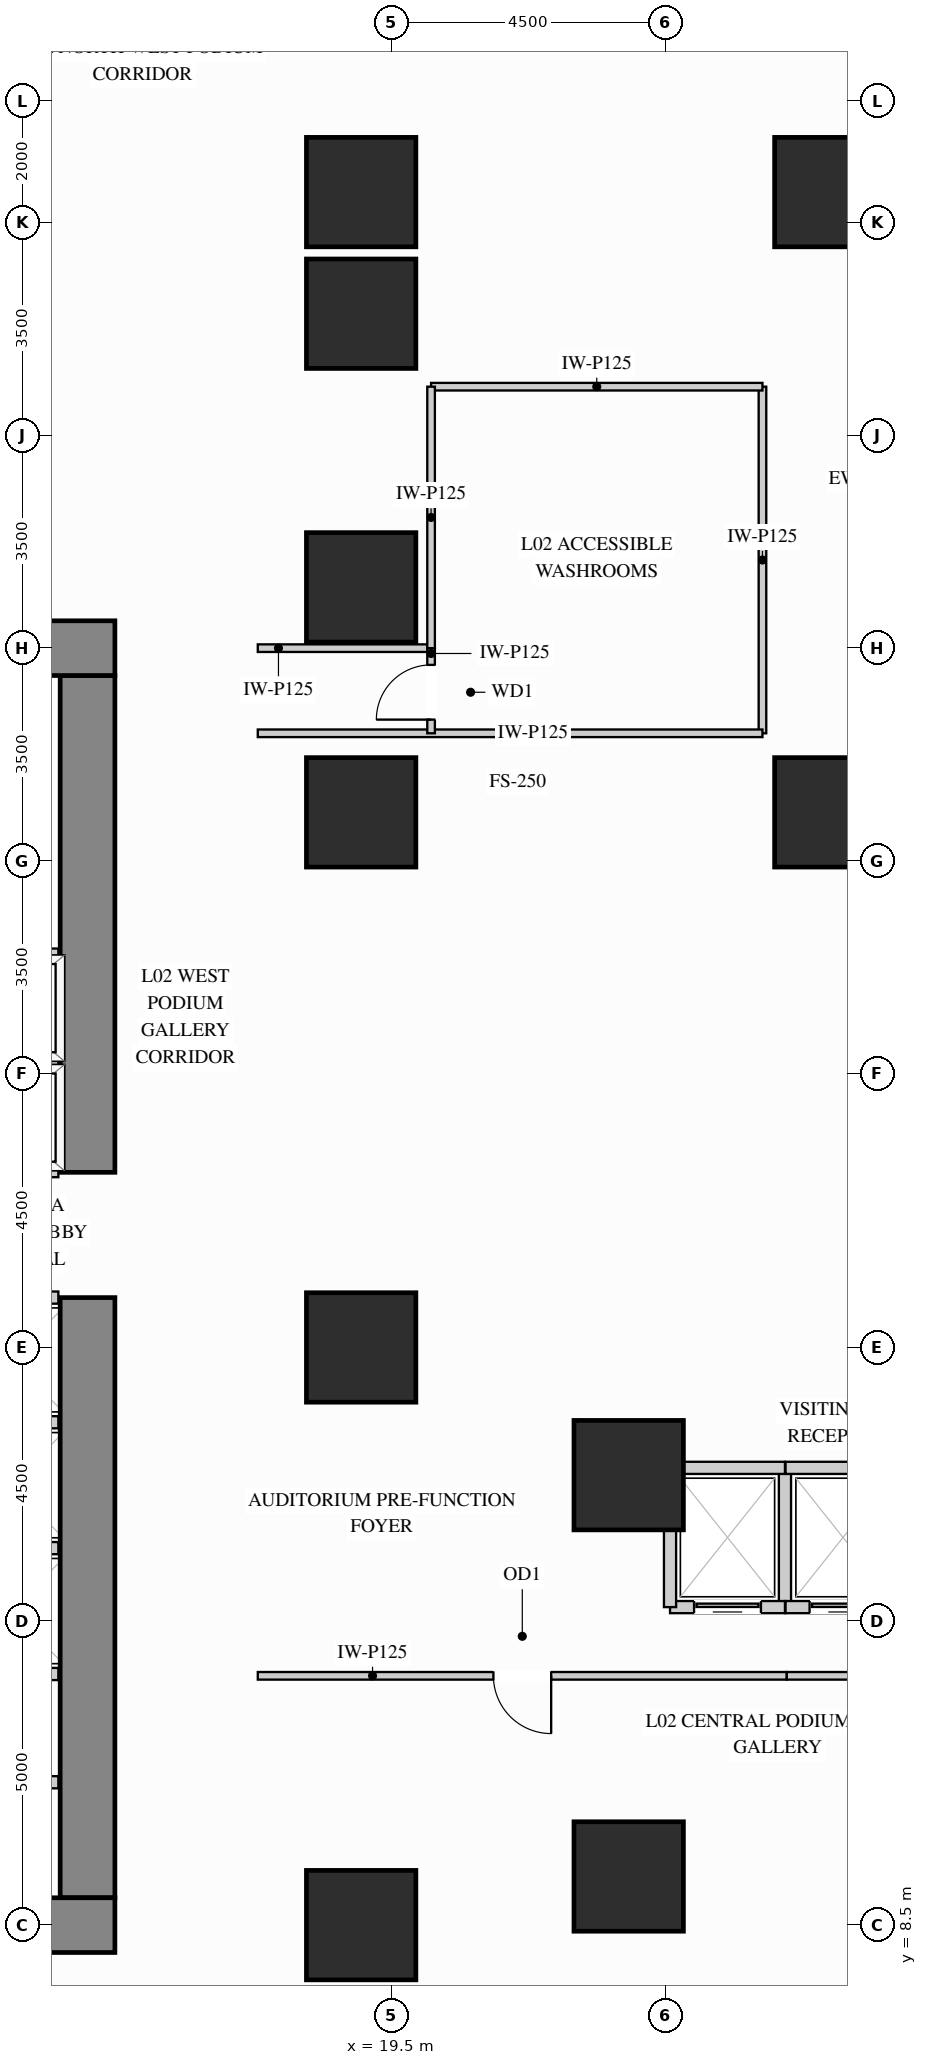
"""IFC4 building model, lengths in metres.
Left out: names, types, materials, properties, quantities, classifications, styles, units other than length and angle.
Written with IfcOpenShell. Run it as: python <this file> out.ifc"""

import sys

from ifc_helpers import new_model, si_unit, direction, frame, frame_2d, origin, origin_2d, place, context, subcontext, project, spatial, rectangle, extrude, source, transform, mapped, element, fill, save


model = new_model("IFC4")
c1 = context("Model", 3, precision=1e-05, world=origin(), true_north=direction((0.0, 1.0)))
c2 = subcontext(c1, "Body", "Model", "MODEL_VIEW")
j1 = project(units=[si_unit("LENGTHUNIT", "METRE"), si_unit("PLANEANGLEUNIT", "RADIAN")], contexts=[c1])
p1 = place(None, origin())
s1 = spatial("IfcSite", under=j1, at=p1, CompositionType="ELEMENT")
p2 = place(p1, origin())
s2 = spatial("IfcBuilding", under=s1, at=p2, CompositionType="ELEMENT")
p3 = place(p2, frame((0.0, 0.0, 9.0)))
s3 = spatial("IfcBuildingStorey", under=s2, at=p3, CompositionType="ELEMENT", Elevation=9.0)
m1 = source(origin(), c2, "Body", "SweptSolid", [
    extrude(rectangle(XDim=1.8, YDim=1.8, at=origin_2d()), origin(), (0.0, 0.0, 1.0), 4.25),
])
for number, where, z_axis, x_axis in (
    (1, (26.7, 26.8, 0.0), (0.0, 0.0, 1.0), (1.0, 0.0, 0.0)),
    (2, (26.7, 37.0, 0.0), (0.0, 0.0, 1.0), (1.0, 0.0, 0.0)),
    (3, (19.0, 8.5, 0.0), (0.0, 0.0, 1.0), (1.0, 0.0, 0.0)),
    (4, (19.0, 18.0, 0.0), (0.0, 0.0, 1.0), (1.0, 0.0, 0.0)),
    (5, (19.0, 26.8, 0.0), (0.0, 0.0, 1.0), (1.0, 0.0, 0.0)),
    (6, (19.0, 30.5, 0.0), (0.0, 0.0, 1.0), (1.0, 0.0, 0.0)),
    (7, (19.0, 35.0, 0.0), (0.0, 0.0, 1.0), (1.0, 0.0, 0.0)),
    (8, (19.0, 37.0, 0.0), (0.0, 0.0, 1.0), (1.0, 0.0, 0.0)),
    (9, (23.4, 9.3, 0.0), (0.0, 0.0, 1.0), (1.0, 0.0, 0.0)),
    (10, (23.4, 15.9, 0.0), (0.0, 0.0, 1.0), (1.0, 0.0, 0.0)),
):
    element("IfcColumn", number, at=place(p3, frame(where, z_axis=z_axis, x_axis=x_axis)), inside=s3, PredefinedType="COLUMN", context=c2, shape_type="MappedRepresentation", body=[
        mapped(m1, transform((0.0, 0.0, 0.0), x_axis=(1.0, 0.0, 0.0), y_axis=(0.0, 1.0, 0.0), z_axis=(0.0, 0.0, 1.0))),
    ])
m2 = source(origin(), c2, "Body", "SweptSolid", [
    extrude(rectangle(XDim=9.87, YDim=0.9, at=frame_2d((4.935, 0.0))), origin(), (0.0, 0.0, 1.0), 4.25),
])
p4 = place(p3, frame((14.5, 8.95, 0.0), z_axis=(0.0, 0.0, 1.0), x_axis=(0.0, 1.0, 0.0)))
e11 = element("IfcWall", 11, at=p4, inside=s3, PredefinedType="SHEAR", context=c2, shape_type="MappedRepresentation", body=[
    mapped(m2, transform((0.0, 0.0, 0.0), x_axis=(1.0, 0.0, 0.0), y_axis=(0.0, 1.0, 0.0), z_axis=(0.0, 0.0, 1.0))),
])
m3 = source(origin(), c2, "Body", "SweptSolid", [
    extrude(rectangle(XDim=8.17, YDim=0.9, at=frame_2d((4.085, 0.0))), origin(), (0.0, 0.0, 1.0), 4.25),
])
p5 = place(p3, frame((14.5, 20.88, 0.0), z_axis=(0.0, 0.0, 1.0), x_axis=(0.0, 1.0, 0.0)))
e12 = element("IfcWall", 12, at=p5, inside=s3, PredefinedType="SHEAR", context=c2, shape_type="MappedRepresentation", body=[
    mapped(m3, transform((0.0, 0.0, 0.0), x_axis=(1.0, 0.0, 0.0), y_axis=(0.0, 1.0, 0.0), z_axis=(0.0, 0.0, 1.0))),
])
m4 = source(origin(), c2, "Body", "SweptSolid", [
    extrude(rectangle(XDim=10.9, YDim=0.9, at=frame_2d((5.45, 0.0))), origin(), (0.0, 0.0, 1.0), 4.25),
])
for number, where, z_axis, x_axis in (
    (13, (4.05, 29.5, 0.0), (0.0, 0.0, 1.0), (1.0, 0.0, 0.0)),
    (14, (4.05, 8.5, 0.0), (0.0, 0.0, 1.0), (1.0, 0.0, 0.0)),
):
    element("IfcWall", number, at=place(p3, frame(where, z_axis=z_axis, x_axis=x_axis)), inside=s3, PredefinedType="SHEAR", context=c2, shape_type="MappedRepresentation", body=[
        mapped(m4, transform((0.0, 0.0, 0.0), x_axis=(1.0, 0.0, 0.0), y_axis=(0.0, 1.0, 0.0), z_axis=(0.0, 0.0, 1.0))),
    ])
p6 = place(p3, frame((17.3, 12.6, 0.0), z_axis=(0.0, 0.0, 1.0), x_axis=(1.0, 0.0, 0.0)))
e15 = element("IfcWall", 15, at=p6, inside=s3, PredefinedType="PARTITIONING", context=c2, shape_type="SweptSolid", body=[
    extrude(rectangle(XDim=8.7, YDim=0.125, at=frame_2d((4.35, 0.0))), origin(), (0.0, 0.0, 1.0), 4.235),
])
p7 = place(p6, frame((3.875, 0.0, 0.0)))
e16 = element("IfcOpeningElement", 16, at=p7, cuts=e15, PredefinedType="OPENING", context=c2, shape_type="SweptSolid", body=[
    extrude(rectangle(XDim=0.95, YDim=2.15, at=frame_2d((0.475, 1.075))), frame((0.0, 0.073, 0.0), z_axis=(0.0, -1.0, 0.0), x_axis=(1.0, 0.0, 0.0)), (0.0, 0.0, 1.0), 0.145),
])
p8 = place(p3, frame((26.0, 12.6, 0.0), z_axis=(0.0, 0.0, 1.0), x_axis=(1.0, 0.0, 0.0)))
e17 = element("IfcWall", 17, at=p8, inside=s3, PredefinedType="PARTITIONING", context=c2, shape_type="SweptSolid", body=[
    extrude(rectangle(XDim=8.08, YDim=0.125, at=frame_2d((4.04, 0.0))), origin(), (0.0, 0.0, 1.0), 4.235),
])
p9 = place(p8, frame((3.725, 0.0, 0.0)))
e18 = element("IfcOpeningElement", 18, at=p9, cuts=e17, PredefinedType="OPENING", context=c2, shape_type="SweptSolid", body=[
    extrude(rectangle(XDim=0.95, YDim=2.15, at=frame_2d((0.475, 1.075))), frame((0.0, 0.073, 0.0), z_axis=(0.0, -1.0, 0.0), x_axis=(1.0, 0.0, 0.0)), (0.0, 0.0, 1.0), 0.145),
])
m5 = source(origin(), c2, "Body", "SweptSolid", [
    extrude(rectangle(XDim=5.7, YDim=0.125, at=frame_2d((2.85, 0.0))), origin(), (0.0, 0.0, 1.0), 4.235),
])
p10 = place(p3, frame((25.6, 28.1, 0.0), z_axis=(0.0, 0.0, 1.0), x_axis=(0.0, 1.0, 0.0)))
e19 = element("IfcWall", 19, at=p10, inside=s3, PredefinedType="PARTITIONING", context=c2, shape_type="MappedRepresentation", body=[
    mapped(m5, transform((0.0, 0.0, 0.0), x_axis=(1.0, 0.0, 0.0), y_axis=(0.0, 1.0, 0.0), z_axis=(0.0, 0.0, 1.0))),
])
m6 = source(origin(), c2, "Body", "SweptSolid", [
    extrude(rectangle(XDim=2.85, YDim=0.125, at=frame_2d((1.425, 0.0))), origin(), (0.0, 0.0, 1.0), 4.235),
])
p11 = place(p3, frame((17.3, 29.5, 0.0), z_axis=(0.0, 0.0, 1.0), x_axis=(1.0, 0.0, 0.0)))
e20 = element("IfcWall", 20, at=p11, inside=s3, PredefinedType="PARTITIONING", context=c2, shape_type="MappedRepresentation", body=[
    mapped(m6, transform((0.0, 0.0, 0.0), x_axis=(1.0, 0.0, 0.0), y_axis=(0.0, 1.0, 0.0), z_axis=(0.0, 0.0, 1.0))),
])
m7 = source(origin(), c2, "Body", "SweptSolid", [
    extrude(rectangle(XDim=5.45, YDim=0.125, at=frame_2d((2.725, 0.0))), origin(), (0.0, 0.0, 1.0), 4.235),
])
p12 = place(p3, frame((20.15, 33.8, 0.0), z_axis=(0.0, 0.0, 1.0), x_axis=(1.0, 0.0, 0.0)))
e21 = element("IfcWall", 21, at=p12, inside=s3, PredefinedType="PARTITIONING", context=c2, shape_type="MappedRepresentation", body=[
    mapped(m7, transform((0.0, 0.0, 0.0), x_axis=(1.0, 0.0, 0.0), y_axis=(0.0, 1.0, 0.0), z_axis=(0.0, 0.0, 1.0))),
])
m8 = source(origin(), c2, "Body", "SweptSolid", [
    extrude(rectangle(XDim=8.3, YDim=0.125, at=frame_2d((4.15, 0.0))), origin(), (0.0, 0.0, 1.0), 4.235),
])
p13 = place(p3, frame((17.3, 28.1, 0.0), z_axis=(0.0, 0.0, 1.0), x_axis=(1.0, 0.0, 0.0)))
e22 = element("IfcWall", 22, at=p13, inside=s3, PredefinedType="PARTITIONING", context=c2, shape_type="MappedRepresentation", body=[
    mapped(m8, transform((0.0, 0.0, 0.0), x_axis=(1.0, 0.0, 0.0), y_axis=(0.0, 1.0, 0.0), z_axis=(0.0, 0.0, 1.0))),
])
m9 = source(origin(), c2, "Body", "SweptSolid", [
    extrude(rectangle(XDim=4.3, YDim=0.125, at=frame_2d((2.15, 0.0))), origin(), (0.0, 0.0, 1.0), 4.235),
])
p14 = place(p3, frame((20.15, 29.5, 0.0), z_axis=(0.0, 0.0, 1.0), x_axis=(0.0, 1.0, 0.0)))
e23 = element("IfcWall", 23, at=p14, inside=s3, PredefinedType="PARTITIONING", context=c2, shape_type="MappedRepresentation", body=[
    mapped(m9, transform((0.0, 0.0, 0.0), x_axis=(1.0, 0.0, 0.0), y_axis=(0.0, 1.0, 0.0), z_axis=(0.0, 0.0, 1.0))),
])
p15 = place(p3, frame((20.15, 28.1, 0.0), z_axis=(0.0, 0.0, 1.0), x_axis=(0.0, 1.0, 0.0)))
e24 = element("IfcWall", 24, at=p15, inside=s3, PredefinedType="PARTITIONING", context=c2, shape_type="SweptSolid", body=[
    extrude(rectangle(XDim=1.4, YDim=0.125, at=frame_2d((0.7, 0.0))), origin(), (0.0, 0.0, 1.0), 4.235),
])
p16 = place(p15, frame((0.225, 0.0, 0.0)))
e25 = element("IfcOpeningElement", 25, at=p16, cuts=e24, PredefinedType="OPENING", context=c2, shape_type="SweptSolid", body=[
    extrude(rectangle(XDim=0.9, YDim=2.15, at=frame_2d((0.45, 1.075))), frame((0.0, 0.073, 0.0), z_axis=(0.0, -1.0, 0.0), x_axis=(1.0, 0.0, 0.0)), (0.0, 0.0, 1.0), 0.145),
])
m10 = source(origin(), c2, "Body", "SweptSolid", [
    extrude(rectangle(XDim=1.6, YDim=0.2, at=frame_2d((0.8, 0.0))), origin(), (0.0, 0.0, 1.0), 4.235),
])
p17 = place(p3, frame((12.42, 10.85, 0.0), z_axis=(0.0, 0.0, 1.0), x_axis=(1.0, 0.0, 0.0)))
e26 = element("IfcWall", 26, at=p17, inside=s3, PredefinedType="PARTITIONING", context=c2, shape_type="MappedRepresentation", body=[
    mapped(m10, transform((0.0, 0.0, 0.0), x_axis=(1.0, 0.0, 0.0), y_axis=(0.0, 1.0, 0.0), z_axis=(0.0, 0.0, 1.0))),
])
m11 = source(origin(), c2, "Body", "SweptSolid", [
    extrude(rectangle(XDim=2.19, YDim=0.2, at=frame_2d((1.095, 0.0))), origin(), (0.0, 0.0, 1.0), 4.235),
])
for number, where, z_axis, x_axis in (
    (27, (11.83, 22.66, 0.0), (0.0, 0.0, 1.0), (1.0, 0.0, 0.0)),
    (28, (11.83, 20.9, 0.0), (0.0, 0.0, 1.0), (1.0, 0.0, 0.0)),
    (29, (11.83, 24.46, 0.0), (0.0, 0.0, 1.0), (1.0, 0.0, 0.0)),
):
    element("IfcWall", number, at=place(p3, frame(where, z_axis=z_axis, x_axis=x_axis)), inside=s3, PredefinedType="PARTITIONING", context=c2, shape_type="MappedRepresentation", body=[
        mapped(m11, transform((0.0, 0.0, 0.0), x_axis=(1.0, 0.0, 0.0), y_axis=(0.0, 1.0, 0.0), z_axis=(0.0, 0.0, 1.0))),
    ])
m12 = source(origin(), c2, "Body", "SweptSolid", [
    extrude(rectangle(XDim=1.79, YDim=0.2, at=frame_2d((0.895, 0.0))), origin(), (0.0, 0.0, 1.0), 4.235),
])
for number, where, z_axis, x_axis in (
    (30, (12.23, 14.7, 0.0), (0.0, 0.0, 1.0), (1.0, 0.0, 0.0)),
    (31, (12.23, 12.63, 0.0), (0.0, 0.0, 1.0), (1.0, 0.0, 0.0)),
    (32, (12.23, 16.77, 0.0), (0.0, 0.0, 1.0), (1.0, 0.0, 0.0)),
    (33, (12.23, 18.82, 0.0), (0.0, 0.0, 1.0), (1.0, 0.0, 0.0)),
):
    element("IfcWall", number, at=place(p3, frame(where, z_axis=z_axis, x_axis=x_axis)), inside=s3, PredefinedType="PARTITIONING", context=c2, shape_type="MappedRepresentation", body=[
        mapped(m12, transform((0.0, 0.0, 0.0), x_axis=(1.0, 0.0, 0.0), y_axis=(0.0, 1.0, 0.0), z_axis=(0.0, 0.0, 1.0))),
    ])
m13 = source(origin(), c2, "Body", "SweptSolid", [
    extrude(rectangle(XDim=2.29, YDim=0.2, at=frame_2d((1.145, 0.0))), origin(), (0.0, 0.0, 1.0), 4.235),
])
p18 = place(p3, frame((25.97, 13.73, 0.0), z_axis=(0.0, 0.0, 1.0), x_axis=(0.0, 1.0, 0.0)))
e34 = element("IfcWall", 34, at=p18, inside=s3, PredefinedType="PARTITIONING", context=c2, shape_type="MappedRepresentation", body=[
    mapped(m13, transform((0.0, 0.0, 0.0), x_axis=(1.0, 0.0, 0.0), y_axis=(0.0, 1.0, 0.0), z_axis=(0.0, 0.0, 1.0))),
])
m14 = source(origin(), c2, "Body", "SweptSolid", [
    extrude(rectangle(XDim=1.89, YDim=0.2, at=frame_2d((0.945, 0.0))), origin(), (0.0, 0.0, 1.0), 4.235),
])
p19 = place(p3, frame((24.08, 16.02, 0.0), z_axis=(0.0, 0.0, 1.0), x_axis=(1.0, 0.0, 0.0)))
e35 = element("IfcWall", 35, at=p19, inside=s3, PredefinedType="PARTITIONING", context=c2, shape_type="MappedRepresentation", body=[
    mapped(m14, transform((0.0, 0.0, 0.0), x_axis=(1.0, 0.0, 0.0), y_axis=(0.0, 1.0, 0.0), z_axis=(0.0, 0.0, 1.0))),
])
p20 = place(p3, frame((24.08, 13.73, 0.0), z_axis=(0.0, 0.0, 1.0), x_axis=(1.0, 0.0, 0.0)))
e36 = element("IfcWall", 36, at=p20, inside=s3, PredefinedType="PARTITIONING", context=c2, shape_type="SweptSolid", body=[
    extrude(rectangle(XDim=1.89, YDim=0.2, at=frame_2d((0.945, 0.0))), origin(), (0.0, 0.0, 1.0), 4.235),
])
p21 = place(p20, frame((0.395, 0.0, 0.0)))
e37 = element("IfcOpeningElement", 37, at=p21, cuts=e36, PredefinedType="OPENING", context=c2, shape_type="SweptSolid", body=[
    extrude(rectangle(XDim=1.1, YDim=2.2, at=frame_2d((0.55, 1.1))), frame((0.0, 0.11, 0.0), z_axis=(0.0, -1.0, 0.0), x_axis=(1.0, 0.0, 0.0)), (0.0, 0.0, 1.0), 0.22),
])
p22 = place(p3, frame((24.08, 13.73, 0.0), z_axis=(0.0, 0.0, 1.0), x_axis=(0.0, 1.0, 0.0)))
e38 = element("IfcWall", 38, at=p22, inside=s3, PredefinedType="PARTITIONING", context=c2, shape_type="MappedRepresentation", body=[
    mapped(m13, transform((0.0, 0.0, 0.0), x_axis=(1.0, 0.0, 0.0), y_axis=(0.0, 1.0, 0.0), z_axis=(0.0, 0.0, 1.0))),
])
m15 = source(origin(), c2, "Body", "SweptSolid", [
    extrude(rectangle(XDim=1.89, YDim=0.2, at=frame_2d((0.945, 0.0))), origin(), (0.0, 0.0, 1.0), 4.235),
])
p23 = place(p3, frame((25.98, 16.02, 0.0), z_axis=(0.0, 0.0, 1.0), x_axis=(1.0, 0.0, 0.0)))
e39 = element("IfcWall", 39, at=p23, inside=s3, PredefinedType="PARTITIONING", context=c2, shape_type="MappedRepresentation", body=[
    mapped(m15, transform((0.0, 0.0, 0.0), x_axis=(1.0, 0.0, 0.0), y_axis=(0.0, 1.0, 0.0), z_axis=(0.0, 0.0, 1.0))),
])
p24 = place(p3, frame((25.98, 13.73, 0.0), z_axis=(0.0, 0.0, 1.0), x_axis=(1.0, 0.0, 0.0)))
e40 = element("IfcWall", 40, at=p24, inside=s3, PredefinedType="PARTITIONING", context=c2, shape_type="SweptSolid", body=[
    extrude(rectangle(XDim=1.89, YDim=0.2, at=frame_2d((0.945, 0.0))), origin(), (0.0, 0.0, 1.0), 4.235),
])
p25 = place(p24, frame((0.395, 0.0, 0.0)))
e41 = element("IfcOpeningElement", 41, at=p25, cuts=e40, PredefinedType="OPENING", context=c2, shape_type="SweptSolid", body=[
    extrude(rectangle(XDim=1.1, YDim=2.2, at=frame_2d((0.55, 1.1))), frame((0.0, 0.11, 0.0), z_axis=(0.0, -1.0, 0.0), x_axis=(1.0, 0.0, 0.0)), (0.0, 0.0, 1.0), 0.22),
])
m16 = source(origin(), c2, "Body", "SweptSolid", [
    extrude(rectangle(XDim=1.1, YDim=2.2, at=frame_2d((0.55, 1.1))), frame((0.0, 0.025, 0.0), z_axis=(0.0, -1.0, 0.0), x_axis=(1.0, 0.0, 0.0)), (0.0, 0.0, 1.0), 0.05),
])
p26 = place(p21, origin())
e42 = element("IfcDoor", 42, at=p26, inside=s3, OperationType="SLIDING_TO_LEFT", PredefinedType="DOOR", context=c2, shape_type="MappedRepresentation", body=[
    mapped(m16, transform((0.0, 0.0, 0.0), x_axis=(1.0, 0.0, 0.0), y_axis=(0.0, 1.0, 0.0), z_axis=(0.0, 0.0, 1.0))),
])
fill(e37, e42)
p27 = place(p25, origin())
e43 = element("IfcDoor", 43, at=p27, inside=s3, OperationType="SLIDING_TO_LEFT", PredefinedType="DOOR", context=c2, shape_type="MappedRepresentation", body=[
    mapped(m16, transform((0.0, 0.0, 0.0), x_axis=(1.0, 0.0, 0.0), y_axis=(0.0, 1.0, 0.0), z_axis=(0.0, 0.0, 1.0))),
])
fill(e41, e43)
m17 = source(origin(), c2, "Body", "SweptSolid", [
    extrude(rectangle(XDim=0.95, YDim=2.15, at=frame_2d((0.475, 1.075))), frame((0.0, 0.025, 0.0), z_axis=(0.0, -1.0, 0.0), x_axis=(1.0, 0.0, 0.0)), (0.0, 0.0, 1.0), 0.05),
])
p28 = place(p7, origin())
e44 = element("IfcDoor", 44, at=p28, inside=s3, OperationType="SINGLE_SWING_RIGHT", PredefinedType="DOOR", context=c2, shape_type="MappedRepresentation", body=[
    mapped(m17, transform((0.0, 0.0, 0.0), x_axis=(1.0, 0.0, 0.0), y_axis=(0.0, 1.0, 0.0), z_axis=(0.0, 0.0, 1.0))),
])
fill(e16, e44)
m18 = source(origin(), c2, "Body", "SweptSolid", [
    extrude(rectangle(XDim=0.9, YDim=2.15, at=frame_2d((0.45, 1.075))), frame((0.0, 0.025, 0.0), z_axis=(0.0, -1.0, 0.0), x_axis=(1.0, 0.0, 0.0)), (0.0, 0.0, 1.0), 0.05),
])
p29 = place(p16, origin())
e45 = element("IfcDoor", 45, at=p29, inside=s3, OperationType="SINGLE_SWING_LEFT", PredefinedType="DOOR", context=c2, shape_type="MappedRepresentation", body=[
    mapped(m18, transform((0.0, 0.0, 0.0), x_axis=(1.0, 0.0, 0.0), y_axis=(0.0, 1.0, 0.0), z_axis=(0.0, 0.0, 1.0))),
])
fill(e25, e45)
save(model, sys.argv[1])
